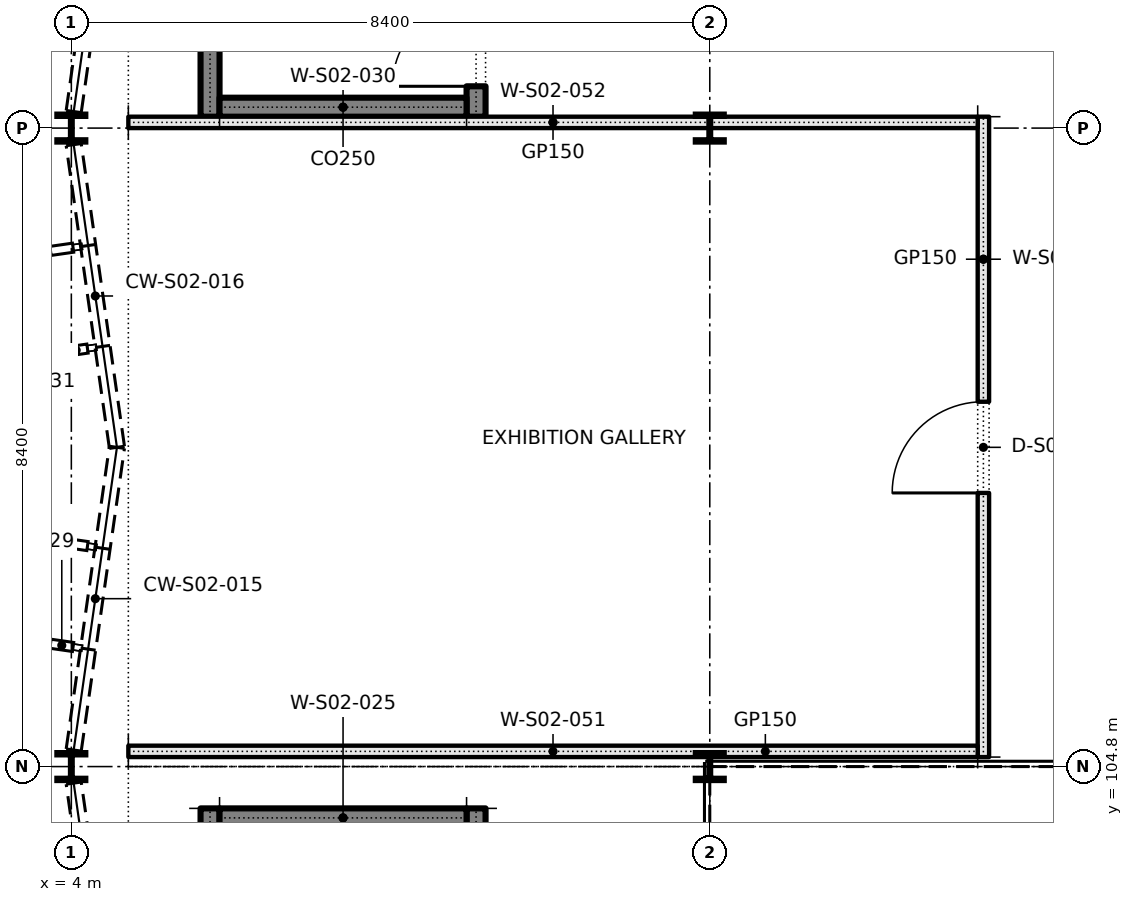
"""IFC4 building model, lengths in metres.
Left out: names, types, materials, properties, quantities, classifications, styles, units other than length and angle.
Written with IfcOpenShell. Run it as: python <this file> out.ifc"""

import sys

from ifc_helpers import new_model, si_unit, direction, frame, frame_2d, origin, origin_2d, place, context, subcontext, project, spatial, rectangle, i_section, extrude, element, fill, save


model = new_model("IFC4")
c1 = context("Model", 3, precision=1e-05, world=origin(), true_north=direction((0.0, 1.0)))
c2 = subcontext(c1, "Body", "Model", "MODEL_VIEW")
j1 = project(units=[si_unit("LENGTHUNIT", "METRE"), si_unit("PLANEANGLEUNIT", "RADIAN")], contexts=[c1])
p1 = place(None, origin())
s1 = spatial("IfcSite", under=j1, at=p1, CompositionType="ELEMENT")
p2 = place(p1, origin())
s2 = spatial("IfcBuilding", under=s1, at=p2, CompositionType="ELEMENT")
p3 = place(p2, frame((0.0, 0.0, 10.2)))
s3 = spatial("IfcBuildingStorey", under=s2, at=p3, CompositionType="ELEMENT", Elevation=10.2)
for number, where, z_axis, x_axis in (
    (1, (4.0, 104.8, 0.0), (0.0, 0.0, 1.0), (1.0, 0.0, 0.0)),
    (2, (4.0, 113.2, 0.0), (0.0, 0.0, 1.0), (1.0, 0.0, 0.0)),
    (3, (12.4, 104.8, 0.0), (0.0, 0.0, 1.0), (1.0, 0.0, 0.0)),
    (4, (12.4, 113.2, 0.0), (0.0, 0.0, 1.0), (1.0, 0.0, 0.0)),
):
    element("IfcColumn", number, at=place(p3, frame(where, z_axis=z_axis, x_axis=x_axis)), inside=s3, PredefinedType="COLUMN", context=c2, shape_type="SweptSolid", body=[
        extrude(i_section(OverallWidth=0.368, OverallDepth=0.356, WebThickness=0.011, FlangeThickness=0.018, FilletRadius=0.015, at=origin_2d()), origin(), (0.0, 0.0, 1.0), 4.8),
    ])
p4 = place(p3, frame((5.825, 96.55, 0.0), z_axis=(0.0, 0.0, 1.0), x_axis=(0.0, 1.0, 0.0)))
e5 = element("IfcWall", 5, at=p4, inside=s3, PredefinedType="SHEAR", context=c2, shape_type="SweptSolid", body=[
    extrude(rectangle(XDim=7.7, YDim=0.25, at=frame_2d((3.85, 0.0))), origin(), (0.0, 0.0, 1.0), 4.8),
])
p5 = place(p3, frame((9.325, 96.55, 0.0), z_axis=(0.0, 0.0, 1.0), x_axis=(0.0, 1.0, 0.0)))
e6 = element("IfcWall", 6, at=p5, inside=s3, PredefinedType="SHEAR", context=c2, shape_type="SweptSolid", body=[
    extrude(rectangle(XDim=7.7, YDim=0.25, at=frame_2d((3.85, 0.0))), origin(), (0.0, 0.0, 1.0), 4.8),
])
p6 = place(p5, frame((0.4, 0.0, 0.0)))
e7 = element("IfcOpeningElement", 7, at=p6, cuts=e6, PredefinedType="OPENING", context=c2, shape_type="SweptSolid", body=[
    extrude(rectangle(XDim=1.1, YDim=2.1, at=frame_2d((0.55, 1.05))), frame((0.0, 0.135, 0.0), z_axis=(0.0, -1.0, 0.0), x_axis=(1.0, 0.0, 0.0)), (0.0, 0.0, 1.0), 0.27),
])
p7 = place(p3, frame((5.95, 104.125, 0.0), z_axis=(0.0, 0.0, 1.0), x_axis=(1.0, 0.0, 0.0)))
e8 = element("IfcWall", 8, at=p7, inside=s3, PredefinedType="SHEAR", context=c2, shape_type="SweptSolid", body=[
    extrude(rectangle(XDim=3.25, YDim=0.25, at=frame_2d((1.625, 0.0))), origin(), (0.0, 0.0, 1.0), 4.8),
])
p8 = place(p3, frame((5.825, 113.35, 0.0), z_axis=(0.0, 0.0, 1.0), x_axis=(0.0, 1.0, 0.0)))
e9 = element("IfcWall", 9, at=p8, inside=s3, PredefinedType="SHEAR", context=c2, shape_type="SweptSolid", body=[
    extrude(rectangle(XDim=7.7, YDim=0.25, at=frame_2d((3.85, 0.0))), origin(), (0.0, 0.0, 1.0), 4.8),
])
p9 = place(p3, frame((9.325, 113.35, 0.0), z_axis=(0.0, 0.0, 1.0), x_axis=(0.0, 1.0, 0.0)))
e10 = element("IfcWall", 10, at=p9, inside=s3, PredefinedType="SHEAR", context=c2, shape_type="SweptSolid", body=[
    extrude(rectangle(XDim=7.7, YDim=0.25, at=frame_2d((3.85, 0.0))), origin(), (0.0, 0.0, 1.0), 4.8),
])
p10 = place(p9, frame((0.4, 0.0, 0.0)))
e11 = element("IfcOpeningElement", 11, at=p10, cuts=e10, PredefinedType="OPENING", context=c2, shape_type="SweptSolid", body=[
    extrude(rectangle(XDim=1.1, YDim=2.1, at=frame_2d((0.55, 1.05))), frame((0.0, 0.135, 0.0), z_axis=(0.0, -1.0, 0.0), x_axis=(1.0, 0.0, 0.0)), (0.0, 0.0, 1.0), 0.27),
])
p11 = place(p3, frame((5.95, 113.475, 0.0), z_axis=(0.0, 0.0, 1.0), x_axis=(1.0, 0.0, 0.0)))
e12 = element("IfcWall", 12, at=p11, inside=s3, PredefinedType="SHEAR", context=c2, shape_type="SweptSolid", body=[
    extrude(rectangle(XDim=3.25, YDim=0.25, at=frame_2d((1.625, 0.0))), origin(), (0.0, 0.0, 1.0), 4.8),
])
p12 = place(p3, frame((16.0, 104.925, 0.0), z_axis=(0.0, 0.0, 1.0), x_axis=(0.0, 1.0, 0.0)))
e13 = element("IfcWall", 13, at=p12, inside=s3, PredefinedType="PARTITIONING", context=c2, shape_type="SweptSolid", body=[
    extrude(rectangle(XDim=8.425, YDim=0.15, at=frame_2d((4.212, 0.0))), origin(), (0.0, 0.0, 1.0), 4.8),
])
p13 = place(p12, frame((3.475, 0.0, 0.0)))
e14 = element("IfcOpeningElement", 14, at=p13, cuts=e13, PredefinedType="OPENING", context=c2, shape_type="SweptSolid", body=[
    extrude(rectangle(XDim=1.2, YDim=2.1, at=frame_2d((0.6, 1.05))), frame((0.0, 0.085, 0.0), z_axis=(0.0, -1.0, 0.0), x_axis=(1.0, 0.0, 0.0)), (0.0, 0.0, 1.0), 0.17),
])
for number, where, z_axis, x_axis in (
    (15, (4.75, 105.0, 0.0), (0.0, 0.0, 1.0), (1.0, 0.0, 0.0)),
    (16, (4.75, 113.275, 0.0), (0.0, 0.0, 1.0), (1.0, 0.0, 0.0)),
):
    element("IfcWall", number, at=place(p3, frame(where, z_axis=z_axis, x_axis=x_axis)), inside=s3, PredefinedType="PARTITIONING", context=c2, shape_type="SweptSolid", body=[
        extrude(rectangle(XDim=11.175, YDim=0.15, at=frame_2d((5.587, 0.0))), origin(), (0.0, 0.0, 1.0), 4.8),
    ])
p14 = place(p10, origin())
e17 = element("IfcDoor", 17, at=p14, inside=s3, OperationType="SINGLE_SWING_LEFT", PredefinedType="DOOR", context=c2, shape_type="SweptSolid", body=[
    extrude(rectangle(XDim=1.1, YDim=2.1, at=frame_2d((0.55, 1.05))), frame((0.0, 0.025, 0.0), z_axis=(0.0, -1.0, 0.0), x_axis=(1.0, 0.0, 0.0)), (0.0, 0.0, 1.0), 0.05),
])
fill(e11, e17)
p15 = place(p13, origin())
e18 = element("IfcDoor", 18, at=p15, inside=s3, OperationType="SINGLE_SWING_LEFT", PredefinedType="DOOR", context=c2, shape_type="SweptSolid", body=[
    extrude(rectangle(XDim=1.2, YDim=2.1, at=frame_2d((0.6, 1.05))), frame((0.0, 0.025, 0.0), z_axis=(0.0, -1.0, 0.0), x_axis=(1.0, 0.0, 0.0)), (0.0, 0.0, 1.0), 0.05),
])
fill(e14, e18)
save(model, sys.argv[1])
